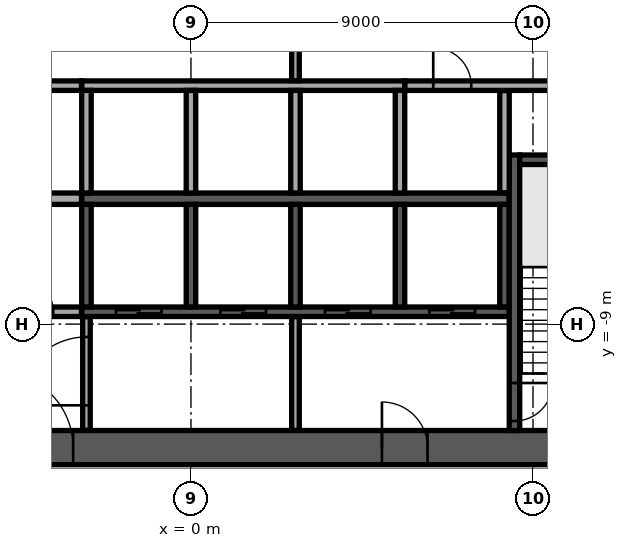
"""IFC4 building model, lengths in metres.
Left out: names, types, materials, properties, quantities, classifications, styles, units other than length and angle.
Written with IfcOpenShell. Run it as: python <this file> out.ifc"""

import sys

from ifc_helpers import new_model, si_unit, direction, frame, frame_2d, origin, place, context, subcontext, project, spatial, rectangle, extrude, element, fill, save


model = new_model("IFC4")
c1 = context("Model", 3, precision=1e-05, world=origin(), true_north=direction((0.0, 1.0)))
c2 = subcontext(c1, "Body", "Model", "MODEL_VIEW")
j1 = project(units=[si_unit("LENGTHUNIT", "METRE"), si_unit("PLANEANGLEUNIT", "RADIAN")], contexts=[c1])
p1 = place(None, origin())
s1 = spatial("IfcSite", under=j1, at=p1, CompositionType="ELEMENT")
p2 = place(p1, origin())
s2 = spatial("IfcBuilding", under=s1, at=p2, CompositionType="ELEMENT")
p3 = place(p2, frame((0.0, 0.0, 205.3)))
s3 = spatial("IfcBuildingStorey", under=s2, at=p3, CompositionType="ELEMENT", Elevation=205.3)
p4 = place(p3, frame((-12.7, -12.25, 0.0), z_axis=(0.0, 0.0, 1.0), x_axis=(1.0, 0.0, 0.0)))
e1 = element("IfcWall", 1, at=p4, inside=s3, PredefinedType="SHEAR", context=c2, shape_type="SweptSolid", body=[
    extrude(rectangle(XDim=25.4, YDim=0.9, at=frame_2d((12.7, 0.0))), origin(), (0.0, 0.0, 1.0), 3.62),
])
p5 = place(p4, frame((7.6, 0.0, 0.0)))
e2 = element("IfcOpeningElement", 2, at=p5, cuts=e1, PredefinedType="OPENING", context=c2, shape_type="SweptSolid", body=[
    extrude(rectangle(XDim=2.0, YDim=2.1, at=frame_2d((1.0, 1.05))), frame((0.0, 0.46, 0.0), z_axis=(0.0, -1.0, 0.0), x_axis=(1.0, 0.0, 0.0)), (0.0, 0.0, 1.0), 0.92),
])
p6 = place(p4, frame((17.725, 0.0, 0.0)))
e3 = element("IfcOpeningElement", 3, at=p6, cuts=e1, PredefinedType="OPENING", context=c2, shape_type="SweptSolid", body=[
    extrude(rectangle(XDim=1.2, YDim=2.1, at=frame_2d((0.6, 1.05))), frame((0.0, 0.46, 0.0), z_axis=(0.0, -1.0, 0.0), x_axis=(1.0, 0.0, 0.0)), (0.0, 0.0, 1.0), 0.92),
])
p7 = place(p4, frame((1.875, 0.0, 0.0)))
e4 = element("IfcOpeningElement", 4, at=p7, cuts=e1, PredefinedType="OPENING", context=c2, shape_type="SweptSolid", body=[
    extrude(rectangle(XDim=1.2, YDim=2.1, at=frame_2d((0.6, 1.05))), frame((0.0, 0.46, 0.0), z_axis=(0.0, -1.0, 0.0), x_axis=(1.0, 0.0, 0.0)), (0.0, 0.0, 1.0), 0.92),
])
p8 = place(p4, frame((22.325, 0.0, 0.0)))
e5 = element("IfcOpeningElement", 5, at=p8, cuts=e1, PredefinedType="OPENING", context=c2, shape_type="SweptSolid", body=[
    extrude(rectangle(XDim=1.2, YDim=2.1, at=frame_2d((0.6, 1.05))), frame((0.0, 0.46, 0.0), z_axis=(0.0, -1.0, 0.0), x_axis=(1.0, 0.0, 0.0)), (0.0, 0.0, 1.0), 0.92),
])
p9 = place(p3, frame((-2.875, -5.7, 0.0), z_axis=(0.0, 0.0, 1.0), x_axis=(1.0, 0.0, 0.0)))
e6 = element("IfcWall", 6, at=p9, inside=s3, PredefinedType="SOLIDWALL", context=c2, shape_type="SweptSolid", body=[
    extrude(rectangle(XDim=11.25, YDim=0.3, at=frame_2d((5.625, 0.0))), origin(), (0.0, 0.0, 1.0), 3.62),
])
p10 = place(p3, frame((-2.875, -2.725, 0.0), z_axis=(0.0, 0.0, 1.0), x_axis=(1.0, 0.0, 0.0)))
e7 = element("IfcWall", 7, at=p10, inside=s3, PredefinedType="SOLIDWALL", context=c2, shape_type="SweptSolid", body=[
    extrude(rectangle(XDim=8.5, YDim=0.25, at=frame_2d((4.25, 0.0))), origin(), (0.0, 0.0, 1.0), 3.62),
])
for number, where, z_axis, x_axis in (
    (8, (-2.75, -5.55, 0.0), (0.0, 0.0, 1.0), (0.0, 1.0, 0.0)),
    (9, (0.0, -5.55, 0.0), (0.0, 0.0, 1.0), (0.0, 1.0, 0.0)),
    (10, (2.75, -5.55, 0.0), (0.0, 0.0, 1.0), (0.0, 1.0, 0.0)),
    (11, (5.5, -5.55, 0.0), (0.0, 0.0, 1.0), (0.0, 1.0, 0.0)),
):
    element("IfcWall", number, at=place(p3, frame(where, z_axis=z_axis, x_axis=x_axis)), inside=s3, PredefinedType="SOLIDWALL", context=c2, shape_type="SweptSolid", body=[
        extrude(rectangle(XDim=2.7, YDim=0.25, at=frame_2d((1.35, 0.0))), origin(), (0.0, 0.0, 1.0), 3.62),
    ])
p11 = place(p3, frame((-2.875, -8.675, 0.0), z_axis=(0.0, 0.0, 1.0), x_axis=(1.0, 0.0, 0.0)))
e12 = element("IfcWall", 12, at=p11, inside=s3, PredefinedType="SOLIDWALL", context=c2, shape_type="SweptSolid", body=[
    extrude(rectangle(XDim=11.25, YDim=0.25, at=frame_2d((5.625, 0.0))), origin(), (0.0, 0.0, 1.0), 3.62),
])
p12 = place(p11, frame((0.9, 0.0, 0.0)))
e13 = element("IfcOpeningElement", 13, at=p12, cuts=e12, PredefinedType="OPENING", context=c2, shape_type="SweptSolid", body=[
    extrude(rectangle(XDim=1.2, YDim=2.1, at=frame_2d((0.6, 1.05))), frame((0.0, 0.135, 0.0), z_axis=(0.0, -1.0, 0.0), x_axis=(1.0, 0.0, 0.0)), (0.0, 0.0, 1.0), 0.27),
])
p13 = place(p11, frame((3.65, 0.0, 0.0)))
e14 = element("IfcOpeningElement", 14, at=p13, cuts=e12, PredefinedType="OPENING", context=c2, shape_type="SweptSolid", body=[
    extrude(rectangle(XDim=1.2, YDim=2.1, at=frame_2d((0.6, 1.05))), frame((0.0, 0.135, 0.0), z_axis=(0.0, -1.0, 0.0), x_axis=(1.0, 0.0, 0.0)), (0.0, 0.0, 1.0), 0.27),
])
p14 = place(p11, frame((6.4, 0.0, 0.0)))
e15 = element("IfcOpeningElement", 15, at=p14, cuts=e12, PredefinedType="OPENING", context=c2, shape_type="SweptSolid", body=[
    extrude(rectangle(XDim=1.2, YDim=2.1, at=frame_2d((0.6, 1.05))), frame((0.0, 0.135, 0.0), z_axis=(0.0, -1.0, 0.0), x_axis=(1.0, 0.0, 0.0)), (0.0, 0.0, 1.0), 0.27),
])
p15 = place(p11, frame((9.15, 0.0, 0.0)))
e16 = element("IfcOpeningElement", 16, at=p15, cuts=e12, PredefinedType="OPENING", context=c2, shape_type="SweptSolid", body=[
    extrude(rectangle(XDim=1.2, YDim=2.1, at=frame_2d((0.6, 1.05))), frame((0.0, 0.135, 0.0), z_axis=(0.0, -1.0, 0.0), x_axis=(1.0, 0.0, 0.0)), (0.0, 0.0, 1.0), 0.27),
])
for number, where, z_axis, x_axis in (
    (17, (-2.75, -8.55, 0.0), (0.0, 0.0, 1.0), (0.0, 1.0, 0.0)),
    (18, (0.0, -8.55, 0.0), (0.0, 0.0, 1.0), (0.0, 1.0, 0.0)),
    (19, (2.75, -8.55, 0.0), (0.0, 0.0, 1.0), (0.0, 1.0, 0.0)),
    (20, (5.5, -8.55, 0.0), (0.0, 0.0, 1.0), (0.0, 1.0, 0.0)),
    (21, (8.25, -8.55, 0.0), (0.0, 0.0, 1.0), (0.0, 1.0, 0.0)),
):
    element("IfcWall", number, at=place(p3, frame(where, z_axis=z_axis, x_axis=x_axis)), inside=s3, PredefinedType="SOLIDWALL", context=c2, shape_type="SweptSolid", body=[
        extrude(rectangle(XDim=2.7, YDim=0.25, at=frame_2d((1.35, 0.0))), origin(), (0.0, 0.0, 1.0), 3.62),
    ])
p16 = place(p3, frame((8.512, -4.55, 0.0), z_axis=(0.0, 0.0, 1.0), x_axis=(0.0, -1.0, 0.0)))
e22 = element("IfcWall", 22, at=p16, inside=s3, PredefinedType="SOLIDWALL", context=c2, shape_type="SweptSolid", body=[
    extrude(rectangle(XDim=7.25, YDim=0.275, at=frame_2d((3.625, 0.0))), origin(), (0.0, 0.0, 1.0), 3.62),
])
p17 = place(p16, frame((6.0, 0.0, 0.0)))
e23 = element("IfcOpeningElement", 23, at=p17, cuts=e22, PredefinedType="OPENING", context=c2, shape_type="SweptSolid", body=[
    extrude(rectangle(XDim=1.0, YDim=2.1, at=frame_2d((0.5, 1.05))), frame((0.0, 0.147, 0.0), z_axis=(0.0, -1.0, 0.0), x_axis=(1.0, 0.0, 0.0)), (0.0, 0.0, 1.0), 0.295),
])
p18 = place(p3, frame((8.65, -4.675, 0.0), z_axis=(0.0, 0.0, 1.0), x_axis=(1.0, 0.0, 0.0)))
e24 = element("IfcWall", 24, at=p18, inside=s3, PredefinedType="SOLIDWALL", context=c2, shape_type="SweptSolid", body=[
    extrude(rectangle(XDim=3.15, YDim=0.25, at=frame_2d((1.575, 0.0))), origin(), (0.0, 0.0, 1.0), 3.62),
])
p19 = place(p3, frame((-2.75, -11.795, 0.0), z_axis=(0.0, 0.0, 1.0), x_axis=(0.0, 1.0, 0.0)))
e25 = element("IfcWall", 25, at=p19, inside=s3, PredefinedType="PARTITIONING", context=c2, shape_type="SweptSolid", body=[
    extrude(rectangle(XDim=2.99, YDim=0.2, at=frame_2d((1.495, 0.0))), origin(), (0.0, 0.0, 1.0), 3.62),
])
p20 = place(p19, frame((0.657, 0.0, 0.0)))
e26 = element("IfcOpeningElement", 26, at=p20, cuts=e25, PredefinedType="OPENING", context=c2, shape_type="SweptSolid", body=[
    extrude(rectangle(XDim=1.8, YDim=2.1, at=frame_2d((0.9, 1.05))), frame((0.0, 0.11, 0.0), z_axis=(0.0, -1.0, 0.0), x_axis=(1.0, 0.0, 0.0)), (0.0, 0.0, 1.0), 0.22),
])
p21 = place(p3, frame((2.75, -11.795, 0.0), z_axis=(0.0, 0.0, 1.0), x_axis=(0.0, 1.0, 0.0)))
e27 = element("IfcWall", 27, at=p21, inside=s3, PredefinedType="PARTITIONING", context=c2, shape_type="SweptSolid", body=[
    extrude(rectangle(XDim=2.99, YDim=0.2, at=frame_2d((1.495, 0.0))), origin(), (0.0, 0.0, 1.0), 3.62),
])
p22 = place(p3, frame((-8.37, -8.675, 0.0), z_axis=(0.0, 0.0, 1.0), x_axis=(1.0, 0.0, 0.0)))
e28 = element("IfcWall", 28, at=p22, inside=s3, PredefinedType="PARTITIONING", context=c2, shape_type="SweptSolid", body=[
    extrude(rectangle(XDim=5.49, YDim=0.25, at=frame_2d((2.745, 0.0))), origin(), (0.0, 0.0, 1.0), 3.62),
])
p23 = place(p22, frame((0.995, 0.0, 0.0)))
e29 = element("IfcOpeningElement", 29, at=p23, cuts=e28, PredefinedType="OPENING", context=c2, shape_type="SweptSolid", body=[
    extrude(rectangle(XDim=1.0, YDim=2.1, at=frame_2d((0.5, 1.05))), frame((0.0, 0.135, 0.0), z_axis=(0.0, -1.0, 0.0), x_axis=(1.0, 0.0, 0.0)), (0.0, 0.0, 1.0), 0.27),
])
p24 = place(p22, frame((3.745, 0.0, 0.0)))
e30 = element("IfcOpeningElement", 30, at=p24, cuts=e28, PredefinedType="OPENING", context=c2, shape_type="SweptSolid", body=[
    extrude(rectangle(XDim=1.0, YDim=2.1, at=frame_2d((0.5, 1.05))), frame((0.0, 0.135, 0.0), z_axis=(0.0, -1.0, 0.0), x_axis=(1.0, 0.0, 0.0)), (0.0, 0.0, 1.0), 0.27),
])
p25 = place(p3, frame((-8.35, -5.7, 0.0), z_axis=(0.0, 0.0, 1.0), x_axis=(1.0, 0.0, 0.0)))
e31 = element("IfcWall", 31, at=p25, inside=s3, PredefinedType="PARTITIONING", context=c2, shape_type="SweptSolid", body=[
    extrude(rectangle(XDim=5.47, YDim=0.3, at=frame_2d((2.735, 0.0))), origin(), (0.0, 0.0, 1.0), 3.62),
])
p26 = place(p3, frame((8.25, -5.545, 0.0), z_axis=(0.0, 0.0, 1.0), x_axis=(0.0, 1.0, 0.0)))
e32 = element("IfcWall", 32, at=p26, inside=s3, PredefinedType="PARTITIONING", context=c2, shape_type="SweptSolid", body=[
    extrude(rectangle(XDim=2.69, YDim=0.25, at=frame_2d((1.345, 0.0))), origin(), (0.0, 0.0, 1.0), 3.62),
])
p27 = place(p3, frame((-11.795, -2.725, 0.0), z_axis=(0.0, 0.0, 1.0), x_axis=(1.0, 0.0, 0.0)))
e33 = element("IfcWall", 33, at=p27, inside=s3, PredefinedType="PARTITIONING", context=c2, shape_type="SweptSolid", body=[
    extrude(rectangle(XDim=8.915, YDim=0.25, at=frame_2d((4.458, 0.0))), origin(), (0.0, 0.0, 1.0), 3.62),
])
p28 = place(p27, frame((1.295, 0.0, 0.0)))
e34 = element("IfcOpeningElement", 34, at=p28, cuts=e33, PredefinedType="OPENING", context=c2, shape_type="SweptSolid", body=[
    extrude(rectangle(XDim=1.0, YDim=2.1, at=frame_2d((0.5, 1.05))), frame((0.0, 0.135, 0.0), z_axis=(0.0, -1.0, 0.0), x_axis=(1.0, 0.0, 0.0)), (0.0, 0.0, 1.0), 0.27),
])
p29 = place(p27, frame((4.42, 0.0, 0.0)))
e35 = element("IfcOpeningElement", 35, at=p29, cuts=e33, PredefinedType="OPENING", context=c2, shape_type="SweptSolid", body=[
    extrude(rectangle(XDim=1.0, YDim=2.1, at=frame_2d((0.5, 1.05))), frame((0.0, 0.135, 0.0), z_axis=(0.0, -1.0, 0.0), x_axis=(1.0, 0.0, 0.0)), (0.0, 0.0, 1.0), 0.27),
])
p30 = place(p3, frame((5.63, -2.725, 0.0), z_axis=(0.0, 0.0, 1.0), x_axis=(1.0, 0.0, 0.0)))
e36 = element("IfcWall", 36, at=p30, inside=s3, PredefinedType="PARTITIONING", context=c2, shape_type="SweptSolid", body=[
    extrude(rectangle(XDim=6.165, YDim=0.25, at=frame_2d((3.083, 0.0))), origin(), (0.0, 0.0, 1.0), 3.62),
])
p31 = place(p30, frame((0.745, 0.0, 0.0)))
e37 = element("IfcOpeningElement", 37, at=p31, cuts=e36, PredefinedType="OPENING", context=c2, shape_type="SweptSolid", body=[
    extrude(rectangle(XDim=1.0, YDim=2.1, at=frame_2d((0.5, 1.05))), frame((0.0, 0.135, 0.0), z_axis=(0.0, -1.0, 0.0), x_axis=(1.0, 0.0, 0.0)), (0.0, 0.0, 1.0), 0.27),
])
p32 = place(p30, frame((3.92, 0.0, 0.0)))
e38 = element("IfcOpeningElement", 38, at=p32, cuts=e36, PredefinedType="OPENING", context=c2, shape_type="SweptSolid", body=[
    extrude(rectangle(XDim=0.9, YDim=2.1, at=frame_2d((0.45, 1.05))), frame((0.0, 0.135, 0.0), z_axis=(0.0, -1.0, 0.0), x_axis=(1.0, 0.0, 0.0)), (0.0, 0.0, 1.0), 0.27),
])
p33 = place(p3, frame((2.75, -2.595, 0.0), z_axis=(0.0, 0.0, 1.0), x_axis=(0.0, 1.0, 0.0)))
e39 = element("IfcWall", 39, at=p33, inside=s3, PredefinedType="PARTITIONING", context=c2, shape_type="SweptSolid", body=[
    extrude(rectangle(XDim=5.19, YDim=0.2, at=frame_2d((2.595, 0.0))), origin(), (0.0, 0.0, 1.0), 3.62),
])
p34 = place(p33, frame((1.395, 0.0, 0.0)))
e40 = element("IfcOpeningElement", 40, at=p34, cuts=e39, PredefinedType="OPENING", context=c2, shape_type="SweptSolid", body=[
    extrude(rectangle(XDim=2.4, YDim=2.4, at=frame_2d((1.2, 1.2))), frame((0.0, 0.11, 0.0), z_axis=(0.0, -1.0, 0.0), x_axis=(1.0, 0.0, 0.0)), (0.0, 0.0, 1.0), 0.22),
])
p35 = place(p3, frame((0.749, -34.782, 0.0), z_axis=(0.0, 0.0, 1.0), x_axis=(0.694657553534, 0.719340589233, 0.0)))
e41 = element("IfcWall", 41, at=p35, inside=s3, PredefinedType="STANDARD", context=c2, shape_type="SweptSolid", body=[
    extrude(rectangle(XDim=49.0, YDim=0.6, at=frame_2d((24.5, 0.0))), origin(), (0.0, 0.0, 1.0), 3.62),
])
p36 = place(p35, frame((1.227, 0.0, 0.9)))
e42 = element("IfcOpeningElement", 42, at=p36, cuts=e41, PredefinedType="OPENING", context=c2, shape_type="SweptSolid", body=[
    extrude(rectangle(XDim=2.0, YDim=2.1, at=frame_2d((1.0, 1.05))), frame((0.0, 0.31, 0.0), z_axis=(0.0, -1.0, 0.0), x_axis=(1.0, 0.0, 0.0)), (0.0, 0.0, 1.0), 0.62),
])
p37 = place(p35, frame((5.682, 0.0, 0.9)))
e43 = element("IfcOpeningElement", 43, at=p37, cuts=e41, PredefinedType="OPENING", context=c2, shape_type="SweptSolid", body=[
    extrude(rectangle(XDim=2.0, YDim=2.1, at=frame_2d((1.0, 1.05))), frame((0.0, 0.31, 0.0), z_axis=(0.0, -1.0, 0.0), x_axis=(1.0, 0.0, 0.0)), (0.0, 0.0, 1.0), 0.62),
])
p38 = place(p35, frame((10.136, 0.0, 0.9)))
e44 = element("IfcOpeningElement", 44, at=p38, cuts=e41, PredefinedType="OPENING", context=c2, shape_type="SweptSolid", body=[
    extrude(rectangle(XDim=2.0, YDim=2.1, at=frame_2d((1.0, 1.05))), frame((0.0, 0.31, 0.0), z_axis=(0.0, -1.0, 0.0), x_axis=(1.0, 0.0, 0.0)), (0.0, 0.0, 1.0), 0.62),
])
p39 = place(p35, frame((14.591, 0.0, 0.9)))
e45 = element("IfcOpeningElement", 45, at=p39, cuts=e41, PredefinedType="OPENING", context=c2, shape_type="SweptSolid", body=[
    extrude(rectangle(XDim=2.0, YDim=2.1, at=frame_2d((1.0, 1.05))), frame((0.0, 0.31, 0.0), z_axis=(0.0, -1.0, 0.0), x_axis=(1.0, 0.0, 0.0)), (0.0, 0.0, 1.0), 0.62),
])
p40 = place(p35, frame((19.045, 0.0, 0.9)))
e46 = element("IfcOpeningElement", 46, at=p40, cuts=e41, PredefinedType="OPENING", context=c2, shape_type="SweptSolid", body=[
    extrude(rectangle(XDim=2.0, YDim=2.1, at=frame_2d((1.0, 1.05))), frame((0.0, 0.31, 0.0), z_axis=(0.0, -1.0, 0.0), x_axis=(1.0, 0.0, 0.0)), (0.0, 0.0, 1.0), 0.62),
])
p41 = place(p35, frame((23.5, 0.0, 0.9)))
e47 = element("IfcOpeningElement", 47, at=p41, cuts=e41, PredefinedType="OPENING", context=c2, shape_type="SweptSolid", body=[
    extrude(rectangle(XDim=2.0, YDim=2.1, at=frame_2d((1.0, 1.05))), frame((0.0, 0.31, 0.0), z_axis=(0.0, -1.0, 0.0), x_axis=(1.0, 0.0, 0.0)), (0.0, 0.0, 1.0), 0.62),
])
p42 = place(p35, frame((27.955, 0.0, 0.9)))
e48 = element("IfcOpeningElement", 48, at=p42, cuts=e41, PredefinedType="OPENING", context=c2, shape_type="SweptSolid", body=[
    extrude(rectangle(XDim=2.0, YDim=2.1, at=frame_2d((1.0, 1.05))), frame((0.0, 0.31, 0.0), z_axis=(0.0, -1.0, 0.0), x_axis=(1.0, 0.0, 0.0)), (0.0, 0.0, 1.0), 0.62),
])
p43 = place(p35, frame((32.409, 0.0, 0.9)))
e49 = element("IfcOpeningElement", 49, at=p43, cuts=e41, PredefinedType="OPENING", context=c2, shape_type="SweptSolid", body=[
    extrude(rectangle(XDim=2.0, YDim=2.1, at=frame_2d((1.0, 1.05))), frame((0.0, 0.31, 0.0), z_axis=(0.0, -1.0, 0.0), x_axis=(1.0, 0.0, 0.0)), (0.0, 0.0, 1.0), 0.62),
])
p44 = place(p35, frame((36.864, 0.0, 0.9)))
e50 = element("IfcOpeningElement", 50, at=p44, cuts=e41, PredefinedType="OPENING", context=c2, shape_type="SweptSolid", body=[
    extrude(rectangle(XDim=2.0, YDim=2.1, at=frame_2d((1.0, 1.05))), frame((0.0, 0.31, 0.0), z_axis=(0.0, -1.0, 0.0), x_axis=(1.0, 0.0, 0.0)), (0.0, 0.0, 1.0), 0.62),
])
p45 = place(p35, frame((41.318, 0.0, 0.9)))
e51 = element("IfcOpeningElement", 51, at=p45, cuts=e41, PredefinedType="OPENING", context=c2, shape_type="SweptSolid", body=[
    extrude(rectangle(XDim=2.0, YDim=2.1, at=frame_2d((1.0, 1.05))), frame((0.0, 0.31, 0.0), z_axis=(0.0, -1.0, 0.0), x_axis=(1.0, 0.0, 0.0)), (0.0, 0.0, 1.0), 0.62),
])
p46 = place(p35, frame((45.773, 0.0, 0.9)))
e52 = element("IfcOpeningElement", 52, at=p46, cuts=e41, PredefinedType="OPENING", context=c2, shape_type="SweptSolid", body=[
    extrude(rectangle(XDim=2.0, YDim=2.1, at=frame_2d((1.0, 1.05))), frame((0.0, 0.31, 0.0), z_axis=(0.0, -1.0, 0.0), x_axis=(1.0, 0.0, 0.0)), (0.0, 0.0, 1.0), 0.62),
])
p47 = place(p3, frame((0.977, -26.89, 0.0), z_axis=(0.0, 0.0, 1.0), x_axis=(0.694659509326, 0.719338700546, 0.0)))
e53 = element("IfcWall", 53, at=p47, inside=s3, PredefinedType="PARTITIONING", context=c2, shape_type="SweptSolid", body=[
    extrude(rectangle(XDim=37.404, YDim=0.15, at=frame_2d((18.702, 0.0))), origin(), (0.0, 0.0, 1.0), 3.17),
])
p48 = place(p47, frame((10.017, 0.0, 0.0)))
e54 = element("IfcOpeningElement", 54, at=p48, cuts=e53, PredefinedType="OPENING", context=c2, shape_type="SweptSolid", body=[
    extrude(rectangle(XDim=1.0, YDim=2.1, at=frame_2d((0.5, 1.05))), frame((0.0, 0.085, 0.0), z_axis=(0.0, -1.0, 0.0), x_axis=(1.0, 0.0, 0.0)), (0.0, 0.0, 1.0), 0.17),
])
p49 = place(p47, frame((16.416, 0.0, 0.0)))
e55 = element("IfcOpeningElement", 55, at=p49, cuts=e53, PredefinedType="OPENING", context=c2, shape_type="SweptSolid", body=[
    extrude(rectangle(XDim=1.0, YDim=2.1, at=frame_2d((0.5, 1.05))), frame((0.0, 0.085, 0.0), z_axis=(0.0, -1.0, 0.0), x_axis=(1.0, 0.0, 0.0)), (0.0, 0.0, 1.0), 0.17),
])
p50 = place(p47, frame((25.838, 0.0, 0.0)))
e56 = element("IfcOpeningElement", 56, at=p50, cuts=e53, PredefinedType="OPENING", context=c2, shape_type="SweptSolid", body=[
    extrude(rectangle(XDim=1.0, YDim=2.1, at=frame_2d((0.5, 1.05))), frame((0.0, 0.085, 0.0), z_axis=(0.0, -1.0, 0.0), x_axis=(1.0, 0.0, 0.0)), (0.0, 0.0, 1.0), 0.17),
])
p51 = place(p47, frame((31.566, 0.0, 0.0)))
e57 = element("IfcOpeningElement", 57, at=p51, cuts=e53, PredefinedType="OPENING", context=c2, shape_type="SweptSolid", body=[
    extrude(rectangle(XDim=1.0, YDim=2.1, at=frame_2d((0.5, 1.05))), frame((0.0, 0.085, 0.0), z_axis=(0.0, -1.0, 0.0), x_axis=(1.0, 0.0, 0.0)), (0.0, 0.0, 1.0), 0.17),
])
p52 = place(p5, origin())
e58 = element("IfcDoor", 58, at=p52, inside=s3, OperationType="SINGLE_SWING_LEFT", PredefinedType="DOOR", context=c2, shape_type="SweptSolid", body=[
    extrude(rectangle(XDim=2.0, YDim=2.1, at=frame_2d((1.0, 1.05))), frame((0.0, 0.025, 0.0), z_axis=(0.0, -1.0, 0.0), x_axis=(1.0, 0.0, 0.0)), (0.0, 0.0, 1.0), 0.05),
])
fill(e2, e58)
p53 = place(p6, origin())
e59 = element("IfcDoor", 59, at=p53, inside=s3, OperationType="SINGLE_SWING_LEFT", PredefinedType="DOOR", context=c2, shape_type="SweptSolid", body=[
    extrude(rectangle(XDim=1.2, YDim=2.1, at=frame_2d((0.6, 1.05))), frame((0.0, 0.025, 0.0), z_axis=(0.0, -1.0, 0.0), x_axis=(1.0, 0.0, 0.0)), (0.0, 0.0, 1.0), 0.05),
])
fill(e3, e59)
p54 = place(p12, origin())
e60 = element("IfcDoor", 60, at=p54, inside=s3, OperationType="DOUBLE_DOOR_SLIDING", PredefinedType="DOOR", context=c2, shape_type="SweptSolid", body=[
    extrude(rectangle(XDim=1.2, YDim=2.1, at=frame_2d((0.6, 1.05))), frame((0.0, 0.025, 0.0), z_axis=(0.0, -1.0, 0.0), x_axis=(1.0, 0.0, 0.0)), (0.0, 0.0, 1.0), 0.05),
])
fill(e13, e60)
p55 = place(p13, origin())
e61 = element("IfcDoor", 61, at=p55, inside=s3, OperationType="DOUBLE_DOOR_SLIDING", PredefinedType="DOOR", context=c2, shape_type="SweptSolid", body=[
    extrude(rectangle(XDim=1.2, YDim=2.1, at=frame_2d((0.6, 1.05))), frame((0.0, 0.025, 0.0), z_axis=(0.0, -1.0, 0.0), x_axis=(1.0, 0.0, 0.0)), (0.0, 0.0, 1.0), 0.05),
])
fill(e14, e61)
p56 = place(p14, origin())
e62 = element("IfcDoor", 62, at=p56, inside=s3, OperationType="DOUBLE_DOOR_SLIDING", PredefinedType="DOOR", context=c2, shape_type="SweptSolid", body=[
    extrude(rectangle(XDim=1.2, YDim=2.1, at=frame_2d((0.6, 1.05))), frame((0.0, 0.025, 0.0), z_axis=(0.0, -1.0, 0.0), x_axis=(1.0, 0.0, 0.0)), (0.0, 0.0, 1.0), 0.05),
])
fill(e15, e62)
p57 = place(p15, origin())
e63 = element("IfcDoor", 63, at=p57, inside=s3, OperationType="DOUBLE_DOOR_SLIDING", PredefinedType="DOOR", context=c2, shape_type="SweptSolid", body=[
    extrude(rectangle(XDim=1.2, YDim=2.1, at=frame_2d((0.6, 1.05))), frame((0.0, 0.025, 0.0), z_axis=(0.0, -1.0, 0.0), x_axis=(1.0, 0.0, 0.0)), (0.0, 0.0, 1.0), 0.05),
])
fill(e16, e63)
p58 = place(p17, origin())
e64 = element("IfcDoor", 64, at=p58, inside=s3, OperationType="SINGLE_SWING_LEFT", PredefinedType="DOOR", context=c2, shape_type="SweptSolid", body=[
    extrude(rectangle(XDim=1.0, YDim=2.1, at=frame_2d((0.5, 1.05))), frame((0.0, 0.025, 0.0), z_axis=(0.0, -1.0, 0.0), x_axis=(1.0, 0.0, 0.0)), (0.0, 0.0, 1.0), 0.05),
])
fill(e23, e64)
p59 = place(p24, origin())
e65 = element("IfcDoor", 65, at=p59, inside=s3, OperationType="SINGLE_SWING_LEFT", PredefinedType="DOOR", context=c2, shape_type="SweptSolid", body=[
    extrude(rectangle(XDim=1.0, YDim=2.1, at=frame_2d((0.5, 1.05))), frame((0.0, 0.025, 0.0), z_axis=(0.0, -1.0, 0.0), x_axis=(1.0, 0.0, 0.0)), (0.0, 0.0, 1.0), 0.05),
])
fill(e30, e65)
p60 = place(p31, origin())
e66 = element("IfcDoor", 66, at=p60, inside=s3, OperationType="SINGLE_SWING_LEFT", PredefinedType="DOOR", context=c2, shape_type="SweptSolid", body=[
    extrude(rectangle(XDim=1.0, YDim=2.1, at=frame_2d((0.5, 1.05))), frame((0.0, 0.025, 0.0), z_axis=(0.0, -1.0, 0.0), x_axis=(1.0, 0.0, 0.0)), (0.0, 0.0, 1.0), 0.05),
])
fill(e37, e66)
p61 = place(p20, origin())
e67 = element("IfcDoor", 67, at=p61, inside=s3, OperationType="SINGLE_SWING_LEFT", PredefinedType="DOOR", context=c2, shape_type="SweptSolid", body=[
    extrude(rectangle(XDim=1.8, YDim=2.1, at=frame_2d((0.9, 1.05))), frame((0.0, 0.025, 0.0), z_axis=(0.0, -1.0, 0.0), x_axis=(1.0, 0.0, 0.0)), (0.0, 0.0, 1.0), 0.05),
])
fill(e26, e67)
save(model, sys.argv[1])
